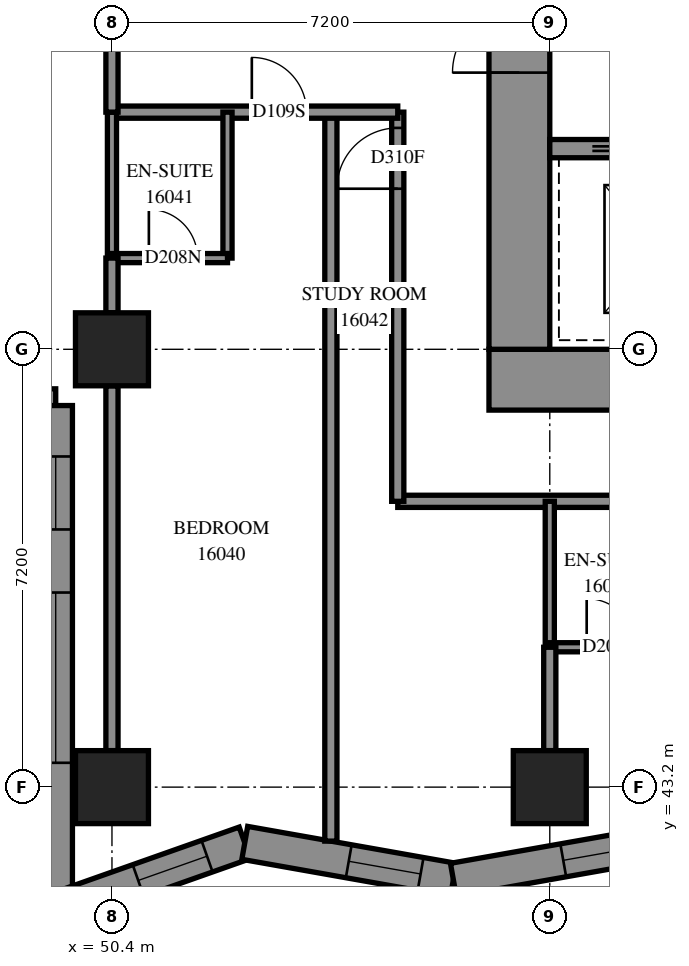
"""IFC4 building model, lengths in metres.
Left out: names, types, materials, properties, quantities, classifications, styles, units other than length and angle.
Written with IfcOpenShell. Run it as: python <this file> out.ifc"""

import sys

from ifc_helpers import new_model, si_unit, direction, frame, frame_2d, origin, origin_2d, place, context, subcontext, project, spatial, polyline, rectangle, outline, extrude, element, fill, save


model = new_model("IFC4")
c1 = context("Model", 3, precision=1e-05, world=origin(), true_north=direction((0.0, 1.0)))
c2 = subcontext(c1, "Body", "Model", "MODEL_VIEW")
j1 = project(units=[si_unit("LENGTHUNIT", "METRE"), si_unit("PLANEANGLEUNIT", "RADIAN")], contexts=[c1])
p1 = place(None, origin())
s1 = spatial("IfcSite", under=j1, at=p1, CompositionType="ELEMENT")
p2 = place(p1, origin())
s2 = spatial("IfcBuilding", under=s1, at=p2, CompositionType="ELEMENT")
p3 = place(p2, frame((0.0, 0.0, 61.0)))
s3 = spatial("IfcBuildingStorey", under=s2, at=p3, CompositionType="ELEMENT", Elevation=61.0)
for number, where, z_axis, x_axis in (
    (1, (50.4, 43.2, 0.0), (0.0, 0.0, 1.0), (1.0, 0.0, 0.0)),
    (2, (50.4, 50.4, 0.0), (0.0, 0.0, 1.0), (1.0, 0.0, 0.0)),
    (3, (57.6, 43.2, 0.0), (0.0, 0.0, 1.0), (1.0, 0.0, 0.0)),
):
    element("IfcColumn", number, at=place(p3, frame(where, z_axis=z_axis, x_axis=x_axis)), inside=s3, PredefinedType="COLUMN", context=c2, shape_type="SweptSolid", body=[
        extrude(rectangle(XDim=1.2, YDim=1.2, at=origin_2d()), origin(), (0.0, 0.0, 1.0), 3.1),
    ])
p4 = place(p3, frame((56.6, 49.9, -0.3), z_axis=(0.0, 0.0, 1.0), x_axis=(1.0, 0.0, 0.0)))
e4 = element("IfcWall", 4, at=p4, inside=s3, PredefinedType="SHEAR", context=c2, shape_type="SweptSolid", body=[
    extrude(rectangle(XDim=16.4, YDim=1.0, at=frame_2d((8.2, 0.0))), origin(), (0.0, 0.0, 1.0), 2.7),
])
p5 = place(p3, frame((57.1, 50.4, -0.3), z_axis=(0.0, 0.0, 1.0), x_axis=(0.0, 1.0, 0.0)))
e5 = element("IfcWall", 5, at=p5, inside=s3, PredefinedType="SHEAR", context=c2, shape_type="SweptSolid", body=[
    extrude(rectangle(XDim=14.4, YDim=1.0, at=frame_2d((7.2, 0.0))), origin(), (0.0, 0.0, 1.0), 2.7),
])
p6 = place(p5, frame((4.55, 0.0, 0.3)))
e6 = element("IfcOpeningElement", 6, at=p6, cuts=e5, PredefinedType="OPENING", context=c2, shape_type="SweptSolid", body=[
    extrude(rectangle(XDim=1.1, YDim=2.1, at=frame_2d((0.55, 1.05))), frame((0.0, 0.51, 0.0), z_axis=(0.0, -1.0, 0.0), x_axis=(1.0, 0.0, 0.0)), (0.0, 0.0, 1.0), 1.02),
])
p7 = place(p5, frame((11.35, 0.0, 0.3)))
e7 = element("IfcOpeningElement", 7, at=p7, cuts=e5, PredefinedType="OPENING", context=c2, shape_type="SweptSolid", body=[
    extrude(rectangle(XDim=1.1, YDim=2.1, at=frame_2d((0.55, 1.05))), frame((0.0, 0.51, 0.0), z_axis=(0.0, -1.0, 0.0), x_axis=(1.0, 0.0, 0.0)), (0.0, 0.0, 1.0), 1.02),
])
p8 = place(p3, frame((57.6, 53.7, 0.0), z_axis=(0.0, 0.0, 1.0), x_axis=(1.0, 0.0, 0.0)))
e8 = element("IfcWall", 8, at=p8, inside=s3, PredefinedType="SOLIDWALL", context=c2, shape_type="SweptSolid", body=[
    extrude(rectangle(XDim=14.4, YDim=0.3, at=frame_2d((7.2, 0.0))), origin(), (0.0, 0.0, 1.0), 3.1),
])
p9 = place(p8, frame((1.25, 0.0, 0.0)))
e9 = element("IfcOpeningElement", 9, at=p9, cuts=e8, PredefinedType="OPENING", context=c2, shape_type="SweptSolid", body=[
    extrude(rectangle(XDim=1.1, YDim=2.1, at=frame_2d((0.55, 1.05))), frame((0.0, 0.16, 0.0), z_axis=(0.0, -1.0, 0.0), x_axis=(1.0, 0.0, 0.0)), (0.0, 0.0, 1.0), 0.32),
])
p10 = place(p8, frame((4.85, 0.0, 0.0)))
e10 = element("IfcOpeningElement", 10, at=p10, cuts=e8, PredefinedType="OPENING", context=c2, shape_type="SweptSolid", body=[
    extrude(rectangle(XDim=1.1, YDim=2.1, at=frame_2d((0.55, 1.05))), frame((0.0, 0.16, 0.0), z_axis=(0.0, -1.0, 0.0), x_axis=(1.0, 0.0, 0.0)), (0.0, 0.0, 1.0), 0.32),
])
p11 = place(p8, frame((8.45, 0.0, 0.0)))
e11 = element("IfcOpeningElement", 11, at=p11, cuts=e8, PredefinedType="OPENING", context=c2, shape_type="SweptSolid", body=[
    extrude(rectangle(XDim=1.1, YDim=2.1, at=frame_2d((0.55, 1.05))), frame((0.0, 0.16, 0.0), z_axis=(0.0, -1.0, 0.0), x_axis=(1.0, 0.0, 0.0)), (0.0, 0.0, 1.0), 0.32),
])
p12 = place(p8, frame((12.05, 0.0, 0.0)))
e12 = element("IfcOpeningElement", 12, at=p12, cuts=e8, PredefinedType="OPENING", context=c2, shape_type="SweptSolid", body=[
    extrude(rectangle(XDim=1.1, YDim=2.1, at=frame_2d((0.55, 1.05))), frame((0.0, 0.16, 0.0), z_axis=(0.0, -1.0, 0.0), x_axis=(1.0, 0.0, 0.0)), (0.0, 0.0, 1.0), 0.32),
])
p13 = place(p3, frame((42.275, 49.475, 0.0), z_axis=(0.0, 0.0, 1.0), x_axis=(1.0, 0.0, 0.0)))
e13 = element("IfcWall", 13, at=p13, inside=s3, PredefinedType="SOLIDWALL", context=c2, shape_type="SweptSolid", body=[
    extrude(outline(polyline([(-0.275, -0.275), (6.925, -0.275), (7.475, 0.275), (0.275, 0.275), (-0.275, -0.275)])), origin(), (0.0, 0.0, 1.0), 3.1),
])
p14 = place(p13, frame((1.325, 0.0, 0.5)))
e14 = element("IfcOpeningElement", 14, at=p14, cuts=e13, PredefinedType="OPENING", context=c2, shape_type="SweptSolid", body=[
    extrude(rectangle(XDim=2.8, YDim=2.45, at=frame_2d((1.4, 1.225))), frame((0.0, 0.285, 0.0), z_axis=(0.0, -1.0, 0.0), x_axis=(1.0, 0.0, 0.0)), (0.0, 0.0, 1.0), 0.57),
])
p15 = place(p13, frame((5.162, 0.0, 0.5)))
e15 = element("IfcOpeningElement", 15, at=p15, cuts=e13, PredefinedType="OPENING", context=c2, shape_type="SweptSolid", body=[
    extrude(rectangle(XDim=1.2, YDim=2.45, at=frame_2d((0.6, 1.225))), frame((0.0, 0.285, 0.0), z_axis=(0.0, -1.0, 0.0), x_axis=(1.0, 0.0, 0.0)), (0.0, 0.0, 1.0), 0.57),
])
p16 = place(p3, frame((49.475, 49.475, 0.0), z_axis=(0.0, 0.0, 1.0), x_axis=(0.0, -1.0, 0.0)))
e16 = element("IfcWall", 16, at=p16, inside=s3, PredefinedType="SOLIDWALL", context=c2, shape_type="SweptSolid", body=[
    extrude(outline(polyline([(0.275, -0.275), (8.678, -0.275), (7.901, 0.275), (-0.275, 0.275), (0.275, -0.275)])), origin(), (0.0, 0.0, 1.0), 3.1),
])
p17 = place(p16, frame((3.075, 0.0, 0.5)))
e17 = element("IfcOpeningElement", 17, at=p17, cuts=e16, PredefinedType="OPENING", context=c2, shape_type="SweptSolid", body=[
    extrude(rectangle(XDim=2.8, YDim=2.45, at=frame_2d((1.4, 1.225))), frame((0.0, 0.285, 0.0), z_axis=(0.0, -1.0, 0.0), x_axis=(1.0, 0.0, 0.0)), (0.0, 0.0, 1.0), 0.57),
])
p18 = place(p16, frame((0.838, 0.0, 0.5)))
e18 = element("IfcOpeningElement", 18, at=p18, cuts=e16, PredefinedType="OPENING", context=c2, shape_type="SweptSolid", body=[
    extrude(rectangle(XDim=1.2, YDim=2.45, at=frame_2d((0.6, 1.225))), frame((0.0, 0.285, 0.0), z_axis=(0.0, -1.0, 0.0), x_axis=(1.0, 0.0, 0.0)), (0.0, 0.0, 1.0), 0.57),
])
p19 = place(p3, frame((49.475, 41.186, 0.0), z_axis=(0.0, 0.0, 1.0), x_axis=(0.9429483298, 0.3329391044, 0.0)))
e19 = element("IfcWall", 19, at=p19, inside=s3, PredefinedType="SOLIDWALL", context=c2, shape_type="SweptSolid", body=[
    extrude(outline(polyline([(-0.389, -0.275), (3.225, -0.275), (3.369, 0.275), (0.389, 0.275), (-0.389, -0.275)])), origin(), (0.0, 0.0, 1.0), 3.1),
])
p20 = place(p19, frame((1.439, 0.0, 0.5)))
e20 = element("IfcOpeningElement", 20, at=p20, cuts=e19, PredefinedType="OPENING", context=c2, shape_type="SweptSolid", body=[
    extrude(rectangle(XDim=1.2, YDim=2.45, at=frame_2d((0.6, 1.225))), frame((0.0, 0.285, 0.0), z_axis=(0.0, -1.0, 0.0), x_axis=(1.0, 0.0, 0.0)), (0.0, 0.0, 1.0), 0.57),
])
p21 = place(p3, frame((52.584, 42.283, 0.0), z_axis=(0.0, 0.0, 1.0), x_axis=(0.9846990638, -0.1742634606, 0.0)))
e21 = element("IfcWall", 21, at=p21, inside=s3, PredefinedType="SOLIDWALL", context=c2, shape_type="SweptSolid", body=[
    extrude(outline(polyline([(0.072, -0.275), (3.533, -0.275), (3.435, 0.275), (-0.072, 0.275), (0.072, -0.275)])), origin(), (0.0, 0.0, 1.0), 3.1),
])
p22 = place(p21, frame((1.737, 0.0, 0.5)))
e22 = element("IfcOpeningElement", 22, at=p22, cuts=e21, PredefinedType="OPENING", context=c2, shape_type="SweptSolid", body=[
    extrude(rectangle(XDim=1.2, YDim=2.45, at=frame_2d((0.6, 1.225))), frame((0.0, 0.285, 0.0), z_axis=(0.0, -1.0, 0.0), x_axis=(1.0, 0.0, 0.0)), (0.0, 0.0, 1.0), 0.57),
])
p23 = place(p3, frame((56.014, 41.676, 0.0), z_axis=(0.0, 0.0, 1.0), x_axis=(0.9846979018, 0.1742700266, 0.0)))
e23 = element("IfcWall", 23, at=p23, inside=s3, PredefinedType="SOLIDWALL", context=c2, shape_type="SweptSolid", body=[
    extrude(outline(polyline([(-0.049, -0.275), (3.412, -0.275), (3.509, 0.275), (0.049, 0.275), (-0.049, -0.275)])), origin(), (0.0, 0.0, 1.0), 3.1),
])
p24 = place(p23, frame((1.835, 0.0, 0.5)))
e24 = element("IfcOpeningElement", 24, at=p24, cuts=e23, PredefinedType="OPENING", context=c2, shape_type="SweptSolid", body=[
    extrude(rectangle(XDim=1.2, YDim=2.45, at=frame_2d((0.6, 1.225))), frame((0.0, 0.285, 0.0), z_axis=(0.0, -1.0, 0.0), x_axis=(1.0, 0.0, 0.0)), (0.0, 0.0, 1.0), 0.57),
])
p25 = place(p3, frame((55.1, 47.9, 0.0), z_axis=(0.0, 0.0, 1.0), x_axis=(1.0, 0.0, 0.0)))
e25 = element("IfcWall", 25, at=p25, inside=s3, PredefinedType="PARTITIONING", context=c2, shape_type="SweptSolid", body=[
    extrude(rectangle(XDim=19.208, YDim=0.2, at=frame_2d((9.604, 0.0))), origin(), (0.0, 0.0, 1.0), 3.1),
])
p26 = place(p25, frame((6.399, 0.0, 0.0)))
e26 = element("IfcOpeningElement", 26, at=p26, cuts=e25, PredefinedType="OPENING", context=c2, shape_type="SweptSolid", body=[
    extrude(rectangle(XDim=0.9, YDim=2.1, at=frame_2d((0.45, 1.05))), frame((0.0, 0.11, 0.0), z_axis=(0.0, -1.0, 0.0), x_axis=(1.0, 0.0, 0.0)), (0.0, 0.0, 1.0), 0.22),
])
p27 = place(p25, frame((13.561, 0.0, 0.0)))
e27 = element("IfcOpeningElement", 27, at=p27, cuts=e25, PredefinedType="OPENING", context=c2, shape_type="SweptSolid", body=[
    extrude(rectangle(XDim=0.9, YDim=2.1, at=frame_2d((0.45, 1.05))), frame((0.0, 0.11, 0.0), z_axis=(0.0, -1.0, 0.0), x_axis=(1.0, 0.0, 0.0)), (0.0, 0.0, 1.0), 0.22),
])
p28 = place(p3, frame((54.0, 42.312, 0.0), z_axis=(0.0, 0.0, 1.0), x_axis=(0.0, 1.0, 0.0)))
e28 = element("IfcWall", 28, at=p28, inside=s3, PredefinedType="PARTITIONING", context=c2, shape_type="SweptSolid", body=[
    extrude(rectangle(XDim=11.988, YDim=0.2, at=frame_2d((5.994, 0.0))), origin(), (0.0, 0.0, 1.0), 3.1),
])
p29 = place(p3, frame((55.1, 47.9, 0.0), z_axis=(0.0, 0.0, 1.0), x_axis=(0.0, 1.0, 0.0)))
e29 = element("IfcWall", 29, at=p29, inside=s3, PredefinedType="PARTITIONING", context=c2, shape_type="SweptSolid", body=[
    extrude(rectangle(XDim=6.4, YDim=0.2, at=frame_2d((3.2, 0.0))), origin(), (0.0, 0.0, 1.0), 3.1),
])
p30 = place(p29, frame((5.141, 0.0, 0.0)))
e30 = element("IfcOpeningElement", 30, at=p30, cuts=e29, PredefinedType="OPENING", context=c2, shape_type="SweptSolid", body=[
    extrude(rectangle(XDim=1.0, YDim=2.1, at=frame_2d((0.5, 1.05))), frame((0.0, 0.11, 0.0), z_axis=(0.0, -1.0, 0.0), x_axis=(1.0, 0.0, 0.0)), (0.0, 0.0, 1.0), 0.22),
])
p31 = place(p3, frame((50.4, 43.8, 0.0), z_axis=(0.0, 0.0, 1.0), x_axis=(0.0, 1.0, 0.0)))
e31 = element("IfcWall", 31, at=p31, inside=s3, PredefinedType="PARTITIONING", context=c2, shape_type="SweptSolid", body=[
    extrude(rectangle(XDim=6.0, YDim=0.2, at=frame_2d((3.0, 0.0))), origin(), (0.0, 0.0, 1.0), 2.6),
])
p32 = place(p3, frame((50.4, 54.3, 0.0), z_axis=(0.0, 0.0, 1.0), x_axis=(1.0, 0.0, 0.0)))
e32 = element("IfcWall", 32, at=p32, inside=s3, PredefinedType="PARTITIONING", context=c2, shape_type="SweptSolid", body=[
    extrude(rectangle(XDim=4.7, YDim=0.2, at=frame_2d((2.35, 0.0))), origin(), (0.0, 0.0, 1.0), 3.1),
])
p33 = place(p32, frame((2.3, 0.0, 0.0)))
e33 = element("IfcOpeningElement", 33, at=p33, cuts=e32, PredefinedType="OPENING", context=c2, shape_type="SweptSolid", body=[
    extrude(rectangle(XDim=0.9, YDim=2.1, at=frame_2d((0.45, 1.05))), frame((0.0, 0.11, 0.0), z_axis=(0.0, -1.0, 0.0), x_axis=(1.0, 0.0, 0.0)), (0.0, 0.0, 1.0), 0.22),
])
for number, where, z_axis, x_axis in (
    (34, (52.3, 51.9, 0.0), (0.0, 0.0, 1.0), (0.0, 1.0, 0.0)),
    (35, (50.4, 51.9, 0.0), (0.0, 0.0, 1.0), (0.0, 1.0, 0.0)),
    (36, (57.6, 45.5, 0.0), (0.0, 0.0, 1.0), (0.0, 1.0, 0.0)),
):
    element("IfcWall", number, at=place(p3, frame(where, z_axis=z_axis, x_axis=x_axis)), inside=s3, PredefinedType="PARTITIONING", context=c2, shape_type="SweptSolid", body=[
        extrude(rectangle(XDim=2.4, YDim=0.15, at=frame_2d((1.2, 0.0))), origin(), (0.0, 0.0, 1.0), 3.1),
    ])
p34 = place(p3, frame((50.4, 51.9, 0.0), z_axis=(0.0, 0.0, 1.0), x_axis=(1.0, 0.0, 0.0)))
e37 = element("IfcWall", 37, at=p34, inside=s3, PredefinedType="PARTITIONING", context=c2, shape_type="SweptSolid", body=[
    extrude(rectangle(XDim=1.9, YDim=0.15, at=frame_2d((0.95, 0.0))), origin(), (0.0, 0.0, 1.0), 3.1),
])
p35 = place(p34, frame((0.607, 0.0, 0.0)))
e38 = element("IfcOpeningElement", 38, at=p35, cuts=e37, PredefinedType="OPENING", context=c2, shape_type="SweptSolid", body=[
    extrude(rectangle(XDim=0.8, YDim=2.1, at=frame_2d((0.4, 1.05))), frame((0.0, 0.085, 0.0), z_axis=(0.0, -1.0, 0.0), x_axis=(1.0, 0.0, 0.0)), (0.0, 0.0, 1.0), 0.17),
])
p36 = place(p3, frame((57.6, 45.5, 0.0), z_axis=(0.0, 0.0, 1.0), x_axis=(1.0, 0.0, 0.0)))
e39 = element("IfcWall", 39, at=p36, inside=s3, PredefinedType="PARTITIONING", context=c2, shape_type="SweptSolid", body=[
    extrude(rectangle(XDim=1.9, YDim=0.15, at=frame_2d((0.95, 0.0))), origin(), (0.0, 0.0, 1.0), 3.1),
])
p37 = place(p36, frame((0.607, 0.0, 0.0)))
e40 = element("IfcOpeningElement", 40, at=p37, cuts=e39, PredefinedType="OPENING", context=c2, shape_type="SweptSolid", body=[
    extrude(rectangle(XDim=0.8, YDim=2.1, at=frame_2d((0.4, 1.05))), frame((0.0, 0.085, 0.0), z_axis=(0.0, -1.0, 0.0), x_axis=(1.0, 0.0, 0.0)), (0.0, 0.0, 1.0), 0.17),
])
p38 = place(p3, frame((50.4, 54.3, 0.0), z_axis=(0.0, 0.0, 1.0), x_axis=(0.0, 1.0, 0.0)))
e41 = element("IfcWall", 41, at=p38, inside=s3, PredefinedType="PARTITIONING", context=c2, shape_type="SweptSolid", body=[
    extrude(rectangle(XDim=1.8, YDim=0.2, at=frame_2d((0.9, 0.0))), origin(), (0.0, 0.0, 1.0), 3.1),
])
p39 = place(p3, frame((57.6, 43.8, 0.0), z_axis=(0.0, 0.0, 1.0), x_axis=(0.0, 1.0, 0.0)))
e42 = element("IfcWall", 42, at=p39, inside=s3, PredefinedType="PARTITIONING", context=c2, shape_type="SweptSolid", body=[
    extrude(rectangle(XDim=1.7, YDim=0.2, at=frame_2d((0.85, 0.0))), origin(), (0.0, 0.0, 1.0), 3.1),
])
p40 = place(p3, frame((50.4, 51.0, 0.0), z_axis=(0.0, 0.0, 1.0), x_axis=(0.0, 1.0, 0.0)))
e43 = element("IfcWall", 43, at=p40, inside=s3, PredefinedType="PARTITIONING", context=c2, shape_type="SweptSolid", body=[
    extrude(rectangle(XDim=0.9, YDim=0.2, at=frame_2d((0.45, 0.0))), origin(), (0.0, 0.0, 1.0), 3.1),
])
p41 = place(p17, origin())
e44 = element("IfcWindow", 44, at=p41, inside=s3, PartitioningType="SINGLE_PANEL", PredefinedType="WINDOW", context=c2, shape_type="SweptSolid", body=[
    extrude(rectangle(XDim=2.8, YDim=2.45, at=frame_2d((1.4, 1.225))), frame((0.0, 0.155, 0.0), z_axis=(0.0, -1.0, 0.0), x_axis=(1.0, 0.0, 0.0)), (0.0, 0.0, 1.0), 0.06),
])
fill(e17, e44)
p42 = place(p18, origin())
e45 = element("IfcWindow", 45, at=p42, inside=s3, PartitioningType="SINGLE_PANEL", PredefinedType="WINDOW", context=c2, shape_type="SweptSolid", body=[
    extrude(rectangle(XDim=1.2, YDim=2.45, at=frame_2d((0.6, 1.225))), frame((0.0, 0.155, 0.0), z_axis=(0.0, -1.0, 0.0), x_axis=(1.0, 0.0, 0.0)), (0.0, 0.0, 1.0), 0.06),
])
fill(e18, e45)
p43 = place(p20, origin())
e46 = element("IfcWindow", 46, at=p43, inside=s3, PartitioningType="SINGLE_PANEL", PredefinedType="WINDOW", context=c2, shape_type="SweptSolid", body=[
    extrude(rectangle(XDim=1.2, YDim=2.45, at=frame_2d((0.6, 1.225))), frame((0.0, 0.155, 0.0), z_axis=(0.0, -1.0, 0.0), x_axis=(1.0, 0.0, 0.0)), (0.0, 0.0, 1.0), 0.06),
])
fill(e20, e46)
p44 = place(p22, origin())
e47 = element("IfcWindow", 47, at=p44, inside=s3, PartitioningType="SINGLE_PANEL", PredefinedType="WINDOW", context=c2, shape_type="SweptSolid", body=[
    extrude(rectangle(XDim=1.2, YDim=2.45, at=frame_2d((0.6, 1.225))), frame((0.0, 0.155, 0.0), z_axis=(0.0, -1.0, 0.0), x_axis=(1.0, 0.0, 0.0)), (0.0, 0.0, 1.0), 0.06),
])
fill(e22, e47)
p45 = place(p24, origin())
e48 = element("IfcWindow", 48, at=p45, inside=s3, PartitioningType="SINGLE_PANEL", PredefinedType="WINDOW", context=c2, shape_type="SweptSolid", body=[
    extrude(rectangle(XDim=1.2, YDim=2.45, at=frame_2d((0.6, 1.225))), frame((0.0, 0.155, 0.0), z_axis=(0.0, -1.0, 0.0), x_axis=(1.0, 0.0, 0.0)), (0.0, 0.0, 1.0), 0.06),
])
fill(e24, e48)
p46 = place(p6, origin())
e49 = element("IfcDoor", 49, at=p46, inside=s3, OperationType="DOUBLE_DOOR_SINGLE_SWING", PredefinedType="DOOR", context=c2, shape_type="SweptSolid", body=[
    extrude(rectangle(XDim=1.1, YDim=2.1, at=frame_2d((0.55, 1.05))), frame((0.0, 0.025, 0.0), z_axis=(0.0, -1.0, 0.0), x_axis=(1.0, 0.0, 0.0)), (0.0, 0.0, 1.0), 0.05),
])
fill(e6, e49)
p47 = place(p33, origin())
e50 = element("IfcDoor", 50, at=p47, inside=s3, OperationType="SINGLE_SWING_LEFT", PredefinedType="DOOR", context=c2, shape_type="SweptSolid", body=[
    extrude(rectangle(XDim=0.9, YDim=2.1, at=frame_2d((0.45, 1.05))), frame((0.0, 0.025, 0.0), z_axis=(0.0, -1.0, 0.0), x_axis=(1.0, 0.0, 0.0)), (0.0, 0.0, 1.0), 0.05),
])
fill(e33, e50)
p48 = place(p35, origin())
e51 = element("IfcDoor", 51, at=p48, inside=s3, OperationType="SINGLE_SWING_RIGHT", PredefinedType="DOOR", context=c2, shape_type="SweptSolid", body=[
    extrude(rectangle(XDim=0.8, YDim=2.1, at=frame_2d((0.4, 1.05))), frame((0.0, 0.025, 0.0), z_axis=(0.0, -1.0, 0.0), x_axis=(1.0, 0.0, 0.0)), (0.0, 0.0, 1.0), 0.05),
])
fill(e38, e51)
p49 = place(p30, origin())
e52 = element("IfcDoor", 52, at=p49, inside=s3, OperationType="SINGLE_SWING_RIGHT", PredefinedType="DOOR", context=c2, shape_type="SweptSolid", body=[
    extrude(rectangle(XDim=1.0, YDim=2.1, at=frame_2d((0.5, 1.05))), frame((0.0, 0.025, 0.0), z_axis=(0.0, -1.0, 0.0), x_axis=(1.0, 0.0, 0.0)), (0.0, 0.0, 1.0), 0.05),
])
fill(e30, e52)
p50 = place(p37, origin())
e53 = element("IfcDoor", 53, at=p50, inside=s3, OperationType="SINGLE_SWING_RIGHT", PredefinedType="DOOR", context=c2, shape_type="SweptSolid", body=[
    extrude(rectangle(XDim=0.8, YDim=2.1, at=frame_2d((0.4, 1.05))), frame((0.0, 0.025, 0.0), z_axis=(0.0, -1.0, 0.0), x_axis=(1.0, 0.0, 0.0)), (0.0, 0.0, 1.0), 0.05),
])
fill(e40, e53)
save(model, sys.argv[1])
